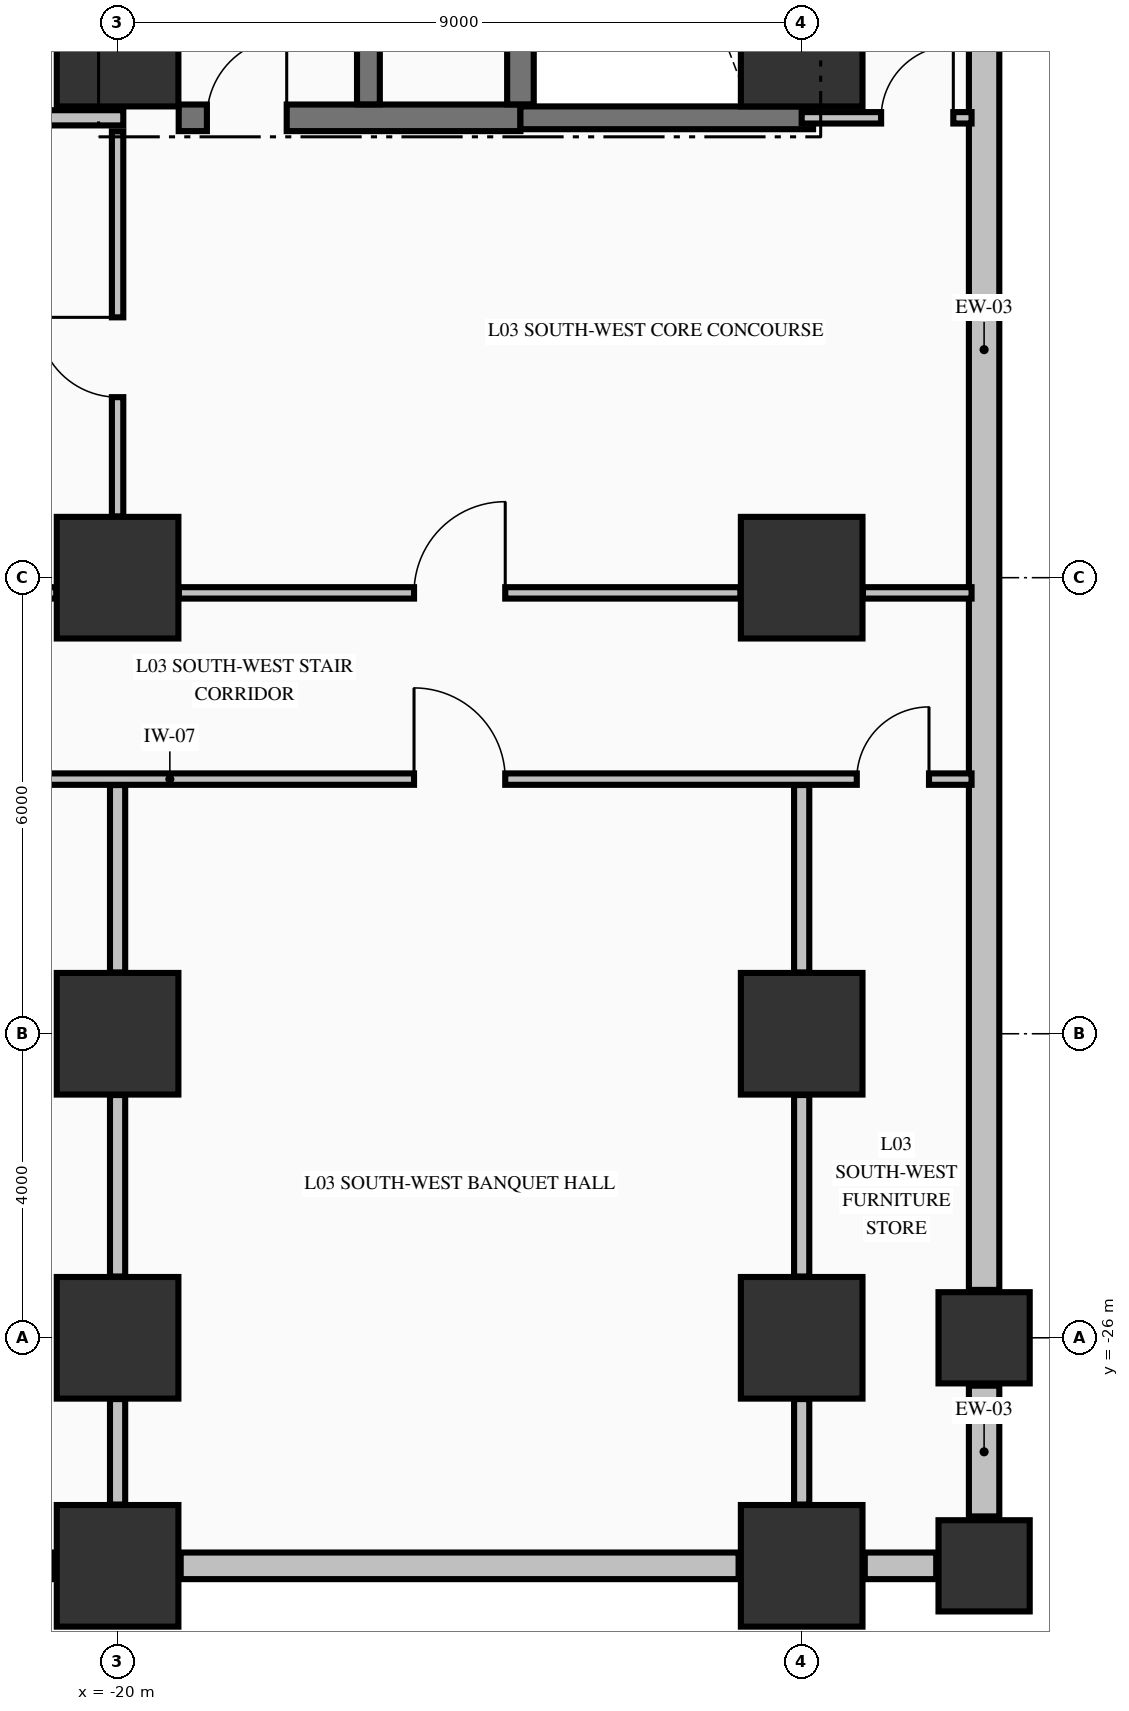
"""IFC4 building model, lengths in metres.
Left out: names, types, materials, properties, quantities, classifications, styles, units other than length and angle.
Written with IfcOpenShell. Run it as: python <this file> out.ifc"""

import sys

from ifc_helpers import new_model, si_unit, direction, frame, frame_2d, origin, origin_2d, place, context, subcontext, project, spatial, rectangle, extrude, element, fill, save


model = new_model("IFC4")
c1 = context("Model", 3, precision=1e-05, world=origin(), true_north=direction((0.0, 1.0)))
c2 = subcontext(c1, "Body", "Model", "MODEL_VIEW")
j1 = project(units=[si_unit("LENGTHUNIT", "METRE"), si_unit("PLANEANGLEUNIT", "RADIAN")], contexts=[c1])
p1 = place(None, origin())
s1 = spatial("IfcSite", under=j1, at=p1, CompositionType="ELEMENT")
p2 = place(p1, origin())
s2 = spatial("IfcBuilding", under=s1, at=p2, CompositionType="ELEMENT")
p3 = place(p2, frame((0.0, 0.0, 16.32)))
s3 = spatial("IfcBuildingStorey", under=s2, at=p3, CompositionType="ELEMENT", Elevation=16.32)
for number, where, z_axis, x_axis in (
    (1, (-20.0, -29.0, 0.0), (0.0, 0.0, 1.0), (1.0, 0.0, 0.0)),
    (2, (-20.0, -26.0, 0.0), (0.0, 0.0, 1.0), (1.0, 0.0, 0.0)),
    (3, (-20.0, -22.0, 0.0), (0.0, 0.0, 1.0), (1.0, 0.0, 0.0)),
    (4, (-20.0, -16.0, 0.0), (0.0, 0.0, 1.0), (1.0, 0.0, 0.0)),
    (5, (-20.0, -9.0, 0.0), (0.0, 0.0, 1.0), (1.0, 0.0, 0.0)),
    (6, (-11.0, -29.0, 0.0), (0.0, 0.0, 1.0), (1.0, 0.0, 0.0)),
    (7, (-11.0, -26.0, 0.0), (0.0, 0.0, 1.0), (1.0, 0.0, 0.0)),
    (8, (-11.0, -22.0, 0.0), (0.0, 0.0, 1.0), (1.0, 0.0, 0.0)),
    (9, (-11.0, -16.0, 0.0), (0.0, 0.0, 1.0), (1.0, 0.0, 0.0)),
    (10, (-11.0, -9.0, 0.0), (0.0, 0.0, 1.0), (1.0, 0.0, 0.0)),
):
    element("IfcColumn", number, at=place(p3, frame(where, z_axis=z_axis, x_axis=x_axis)), inside=s3, PredefinedType="COLUMN", context=c2, shape_type="SweptSolid", body=[
        extrude(rectangle(XDim=1.6, YDim=1.6, at=origin_2d()), origin(), (0.0, 0.0, 1.0), 4.99),
    ])
for number, where, z_axis, x_axis in (
    (11, (-8.6, -29.0, 0.0), (0.0, 0.0, 1.0), (1.0, 0.0, 0.0)),
    (12, (-8.6, -26.0, 0.0), (0.0, 0.0, 1.0), (1.0, 0.0, 0.0)),
):
    element("IfcColumn", number, at=place(p3, frame(where, z_axis=z_axis, x_axis=x_axis)), inside=s3, PredefinedType="COLUMN", context=c2, shape_type="SweptSolid", body=[
        extrude(rectangle(XDim=1.2, YDim=1.2, at=origin_2d()), origin(), (0.0, 0.0, 1.0), 4.99),
    ])
p4 = place(p3, frame((-22.545, -29.0, 0.0), z_axis=(0.0, 0.0, 1.0), x_axis=(1.0, 0.0, 0.0)))
e13 = element("IfcWall", 13, at=p4, inside=s3, PredefinedType="STANDARD", context=c2, shape_type="SweptSolid", body=[
    extrude(rectangle(XDim=1.715, YDim=0.35, at=frame_2d((0.857, 0.0))), origin(), (0.0, 0.0, 1.0), 3.332),
])
p5 = place(p3, frame((-19.17, -29.0, 0.0), z_axis=(0.0, 0.0, 1.0), x_axis=(1.0, 0.0, 0.0)))
e14 = element("IfcWall", 14, at=p5, inside=s3, PredefinedType="STANDARD", context=c2, shape_type="SweptSolid", body=[
    extrude(rectangle(XDim=7.34, YDim=0.35, at=frame_2d((3.67, 0.0))), origin(), (0.0, 0.0, 1.0), 3.332),
])
p6 = place(p3, frame((-10.17, -29.0, 0.0), z_axis=(0.0, 0.0, 1.0), x_axis=(1.0, 0.0, 0.0)))
e15 = element("IfcWall", 15, at=p6, inside=s3, PredefinedType="STANDARD", context=c2, shape_type="SweptSolid", body=[
    extrude(rectangle(XDim=0.94, YDim=0.35, at=frame_2d((0.47, 0.0))), origin(), (0.0, 0.0, 1.0), 3.332),
])
p7 = place(p3, frame((-8.6, -28.35, 0.0), z_axis=(0.0, 0.0, 1.0), x_axis=(0.0, 1.0, 0.0)))
e16 = element("IfcWall", 16, at=p7, inside=s3, PredefinedType="STANDARD", context=c2, shape_type="SweptSolid", body=[
    extrude(rectangle(XDim=1.72, YDim=0.4, at=frame_2d((0.86, 0.0))), origin(), (0.0, 0.0, 1.0), 3.332),
])
p8 = place(p3, frame((-8.6, -25.37, 0.0), z_axis=(0.0, 0.0, 1.0), x_axis=(0.0, 1.0, 0.0)))
e17 = element("IfcWall", 17, at=p8, inside=s3, PredefinedType="STANDARD", context=c2, shape_type="SweptSolid", body=[
    extrude(rectangle(XDim=24.72, YDim=0.4, at=frame_2d((12.36, 0.0))), origin(), (0.0, 0.0, 1.0), 2.582),
])
p9 = place(p3, frame((-19.196, -9.95, 0.0), z_axis=(0.0, 0.0, 1.0), x_axis=(1.0, 0.0, 0.0)))
e18 = element("IfcWall", 18, at=p9, inside=s3, PredefinedType="SHEAR", context=c2, shape_type="SweptSolid", body=[
    extrude(rectangle(XDim=4.496, YDim=0.35, at=frame_2d((2.248, 0.0))), origin(), (0.0, 0.0, 1.0), 4.99),
])
p10 = place(p9, frame((0.371, 0.0, 0.0)))
e19 = element("IfcOpeningElement", 19, at=p10, cuts=e18, PredefinedType="OPENING", context=c2, shape_type="SweptSolid", body=[
    extrude(rectangle(XDim=1.05, YDim=2.15, at=frame_2d((0.525, 1.075))), frame((0.0, 0.185, 0.0), z_axis=(0.0, -1.0, 0.0), x_axis=(1.0, 0.0, 0.0)), (0.0, 0.0, 1.0), 0.37),
])
p11 = place(p3, frame((-14.7, -9.95, 0.0), z_axis=(0.0, 0.0, 1.0), x_axis=(1.0, 0.0, 0.0)))
e20 = element("IfcWall", 20, at=p11, inside=s3, PredefinedType="SHEAR", context=c2, shape_type="SweptSolid", body=[
    extrude(rectangle(XDim=3.85, YDim=0.3, at=frame_2d((1.925, 0.0))), origin(), (0.0, 0.0, 1.0), 4.99),
])
p12 = place(p3, frame((-29.85, -18.65, 0.0), z_axis=(0.0, 0.0, 1.0), x_axis=(1.0, 0.0, 0.0)))
e21 = element("IfcWall", 21, at=p12, inside=s3, PredefinedType="PARTITIONING", context=c2, shape_type="SweptSolid", body=[
    extrude(rectangle(XDim=21.085, YDim=0.15, at=frame_2d((10.542, 0.0))), origin(), (0.0, 0.0, 1.0), 4.99),
])
p13 = place(p12, frame((1.425, 0.0, 0.0)))
e22 = element("IfcOpeningElement", 22, at=p13, cuts=e21, PredefinedType="OPENING", context=c2, shape_type="SweptSolid", body=[
    extrude(rectangle(XDim=0.95, YDim=2.15, at=frame_2d((0.475, 1.075))), frame((0.0, 0.085, 0.0), z_axis=(0.0, -1.0, 0.0), x_axis=(1.0, 0.0, 0.0)), (0.0, 0.0, 1.0), 0.17),
])
p14 = place(p12, frame((6.375, 0.0, 0.0)))
e23 = element("IfcOpeningElement", 23, at=p14, cuts=e21, PredefinedType="OPENING", context=c2, shape_type="SweptSolid", body=[
    extrude(rectangle(XDim=0.95, YDim=2.15, at=frame_2d((0.475, 1.075))), frame((0.0, 0.085, 0.0), z_axis=(0.0, -1.0, 0.0), x_axis=(1.0, 0.0, 0.0)), (0.0, 0.0, 1.0), 0.17),
])
p15 = place(p12, frame((13.75, 0.0, 0.0)))
e24 = element("IfcOpeningElement", 24, at=p15, cuts=e21, PredefinedType="OPENING", context=c2, shape_type="SweptSolid", body=[
    extrude(rectangle(XDim=1.2, YDim=2.15, at=frame_2d((0.6, 1.075))), frame((0.0, 0.085, 0.0), z_axis=(0.0, -1.0, 0.0), x_axis=(1.0, 0.0, 0.0)), (0.0, 0.0, 1.0), 0.17),
])
p16 = place(p12, frame((19.575, 0.0, 0.0)))
e25 = element("IfcOpeningElement", 25, at=p16, cuts=e21, PredefinedType="OPENING", context=c2, shape_type="SweptSolid", body=[
    extrude(rectangle(XDim=0.95, YDim=2.15, at=frame_2d((0.475, 1.075))), frame((0.0, 0.085, 0.0), z_axis=(0.0, -1.0, 0.0), x_axis=(1.0, 0.0, 0.0)), (0.0, 0.0, 1.0), 0.17),
])
p17 = place(p3, frame((-25.294, -16.2, 0.0), z_axis=(0.0, 0.0, 1.0), x_axis=(1.0, 0.0, 0.0)))
e26 = element("IfcWall", 26, at=p17, inside=s3, PredefinedType="PARTITIONING", context=c2, shape_type="SweptSolid", body=[
    extrude(rectangle(XDim=4.488, YDim=0.15, at=frame_2d((2.244, 0.0))), origin(), (0.0, 0.0, 1.0), 3.332),
])
p18 = place(p17, frame((0.619, 0.0, 0.0)))
e27 = element("IfcOpeningElement", 27, at=p18, cuts=e26, PredefinedType="OPENING", context=c2, shape_type="SweptSolid", body=[
    extrude(rectangle(XDim=0.95, YDim=2.15, at=frame_2d((0.475, 1.075))), frame((0.0, 0.085, 0.0), z_axis=(0.0, -1.0, 0.0), x_axis=(1.0, 0.0, 0.0)), (0.0, 0.0, 1.0), 0.17),
])
p19 = place(p3, frame((-19.194, -16.2, 0.0), z_axis=(0.0, 0.0, 1.0), x_axis=(1.0, 0.0, 0.0)))
e28 = element("IfcWall", 28, at=p19, inside=s3, PredefinedType="PARTITIONING", context=c2, shape_type="SweptSolid", body=[
    extrude(rectangle(XDim=7.388, YDim=0.15, at=frame_2d((3.694, 0.0))), origin(), (0.0, 0.0, 1.0), 3.332),
])
p20 = place(p19, frame((3.094, 0.0, 0.0)))
e29 = element("IfcOpeningElement", 29, at=p20, cuts=e28, PredefinedType="OPENING", context=c2, shape_type="SweptSolid", body=[
    extrude(rectangle(XDim=1.2, YDim=2.15, at=frame_2d((0.6, 1.075))), frame((0.0, 0.085, 0.0), z_axis=(0.0, -1.0, 0.0), x_axis=(1.0, 0.0, 0.0)), (0.0, 0.0, 1.0), 0.17),
])
p21 = place(p3, frame((-10.194, -16.2, 0.0), z_axis=(0.0, 0.0, 1.0), x_axis=(1.0, 0.0, 0.0)))
e30 = element("IfcWall", 30, at=p21, inside=s3, PredefinedType="PARTITIONING", context=c2, shape_type="SweptSolid", body=[
    extrude(rectangle(XDim=1.429, YDim=0.15, at=frame_2d((0.715, 0.0))), origin(), (0.0, 0.0, 1.0), 4.99),
])
p22 = place(p3, frame((-22.475, -9.95, 0.0), z_axis=(0.0, 0.0, 1.0), x_axis=(1.0, 0.0, 0.0)))
e31 = element("IfcWall", 31, at=p22, inside=s3, PredefinedType="PARTITIONING", context=c2, shape_type="SweptSolid", body=[
    extrude(rectangle(XDim=2.55, YDim=0.2, at=frame_2d((1.275, 0.0))), origin(), (0.0, 0.0, 1.0), 4.99),
])
p23 = place(p22, frame((0.455, 0.0, 0.0)))
e32 = element("IfcOpeningElement", 32, at=p23, cuts=e31, PredefinedType="OPENING", context=c2, shape_type="SweptSolid", body=[
    extrude(rectangle(XDim=1.0, YDim=2.15, at=frame_2d((0.5, 1.075))), frame((0.0, 0.11, 0.0), z_axis=(0.0, -1.0, 0.0), x_axis=(1.0, 0.0, 0.0)), (0.0, 0.0, 1.0), 0.22),
])
p24 = place(p3, frame((-11.0, -9.95, 0.0), z_axis=(0.0, 0.0, 1.0), x_axis=(1.0, 0.0, 0.0)))
e33 = element("IfcWall", 33, at=p24, inside=s3, PredefinedType="PARTITIONING", context=c2, shape_type="SweptSolid", body=[
    extrude(rectangle(XDim=2.235, YDim=0.15, at=frame_2d((1.118, 0.0))), origin(), (0.0, 0.0, 1.0), 4.99),
])
p25 = place(p24, frame((1.045, 0.0, 0.0)))
e34 = element("IfcOpeningElement", 34, at=p25, cuts=e33, PredefinedType="OPENING", context=c2, shape_type="SweptSolid", body=[
    extrude(rectangle(XDim=0.95, YDim=2.15, at=frame_2d((0.475, 1.075))), frame((0.0, 0.085, 0.0), z_axis=(0.0, -1.0, 0.0), x_axis=(1.0, 0.0, 0.0)), (0.0, 0.0, 1.0), 0.17),
])
p26 = place(p3, frame((-16.7, -9.773, 0.0), z_axis=(0.0, 0.0, 1.0), x_axis=(0.0, 1.0, 0.0)))
e35 = element("IfcWall", 35, at=p26, inside=s3, PredefinedType="SHEAR", context=c2, shape_type="SweptSolid", body=[
    extrude(rectangle(XDim=9.371, YDim=0.3, at=frame_2d((4.686, 0.0))), origin(), (0.0, 0.0, 1.0), 4.99),
])
p27 = place(p3, frame((-14.7, -9.773, 0.0), z_axis=(0.0, 0.0, 1.0), x_axis=(0.0, 1.0, 0.0)))
e36 = element("IfcWall", 36, at=p27, inside=s3, PredefinedType="SHEAR", context=c2, shape_type="SweptSolid", body=[
    extrude(rectangle(XDim=9.371, YDim=0.35, at=frame_2d((4.686, 0.0))), origin(), (0.0, 0.0, 1.0), 4.99),
])
p28 = place(p3, frame((-20.0, -28.194, 0.0), z_axis=(0.0, 0.0, 1.0), x_axis=(0.0, 1.0, 0.0)))
e37 = element("IfcWall", 37, at=p28, inside=s3, PredefinedType="PARTITIONING", context=c2, shape_type="SweptSolid", body=[
    extrude(rectangle(XDim=1.388, YDim=0.2, at=frame_2d((0.694, 0.0))), origin(), (0.0, 0.0, 1.0), 3.332),
])
p29 = place(p3, frame((-20.0, -25.194, 0.0), z_axis=(0.0, 0.0, 1.0), x_axis=(0.0, 1.0, 0.0)))
e38 = element("IfcWall", 38, at=p29, inside=s3, PredefinedType="PARTITIONING", context=c2, shape_type="SweptSolid", body=[
    extrude(rectangle(XDim=2.388, YDim=0.2, at=frame_2d((1.194, 0.0))), origin(), (0.0, 0.0, 1.0), 3.332),
])
p30 = place(p3, frame((-20.0, -21.194, 0.0), z_axis=(0.0, 0.0, 1.0), x_axis=(0.0, 1.0, 0.0)))
e39 = element("IfcWall", 39, at=p30, inside=s3, PredefinedType="PARTITIONING", context=c2, shape_type="SweptSolid", body=[
    extrude(rectangle(XDim=2.466, YDim=0.2, at=frame_2d((1.233, 0.0))), origin(), (0.0, 0.0, 1.0), 3.332),
])
p31 = place(p3, frame((-20.0, -15.194, 0.0), z_axis=(0.0, 0.0, 1.0), x_axis=(0.0, 1.0, 0.0)))
e40 = element("IfcWall", 40, at=p31, inside=s3, PredefinedType="PARTITIONING", context=c2, shape_type="SweptSolid", body=[
    extrude(rectangle(XDim=5.066, YDim=0.15, at=frame_2d((2.533, 0.0))), origin(), (0.0, 0.0, 1.0), 4.99),
])
p32 = place(p31, frame((1.569, 0.0, 0.0)))
e41 = element("IfcOpeningElement", 41, at=p32, cuts=e40, PredefinedType="OPENING", context=c2, shape_type="SweptSolid", body=[
    extrude(rectangle(XDim=1.05, YDim=2.15, at=frame_2d((0.525, 1.075))), frame((0.0, 0.085, 0.0), z_axis=(0.0, -1.0, 0.0), x_axis=(1.0, 0.0, 0.0)), (0.0, 0.0, 1.0), 0.17),
])
p33 = place(p3, frame((-11.0, -28.194, 0.0), z_axis=(0.0, 0.0, 1.0), x_axis=(0.0, 1.0, 0.0)))
e42 = element("IfcWall", 42, at=p33, inside=s3, PredefinedType="PARTITIONING", context=c2, shape_type="SweptSolid", body=[
    extrude(rectangle(XDim=1.388, YDim=0.2, at=frame_2d((0.694, 0.0))), origin(), (0.0, 0.0, 1.0), 3.332),
])
p34 = place(p3, frame((-11.0, -25.194, 0.0), z_axis=(0.0, 0.0, 1.0), x_axis=(0.0, 1.0, 0.0)))
e43 = element("IfcWall", 43, at=p34, inside=s3, PredefinedType="PARTITIONING", context=c2, shape_type="SweptSolid", body=[
    extrude(rectangle(XDim=2.388, YDim=0.2, at=frame_2d((1.194, 0.0))), origin(), (0.0, 0.0, 1.0), 3.332),
])
p35 = place(p3, frame((-11.0, -21.194, 0.0), z_axis=(0.0, 0.0, 1.0), x_axis=(0.0, 1.0, 0.0)))
e44 = element("IfcWall", 44, at=p35, inside=s3, PredefinedType="PARTITIONING", context=c2, shape_type="SweptSolid", body=[
    extrude(rectangle(XDim=2.466, YDim=0.2, at=frame_2d((1.233, 0.0))), origin(), (0.0, 0.0, 1.0), 3.332),
])
p36 = place(p10, origin())
e45 = element("IfcDoor", 45, at=p36, inside=s3, OperationType="SINGLE_SWING_RIGHT", PredefinedType="DOOR", context=c2, shape_type="SweptSolid", body=[
    extrude(rectangle(XDim=1.05, YDim=2.15, at=frame_2d((0.525, 1.075))), frame((0.0, 0.025, 0.0), z_axis=(0.0, -1.0, 0.0), x_axis=(1.0, 0.0, 0.0)), (0.0, 0.0, 1.0), 0.05),
])
fill(e19, e45)
p37 = place(p25, origin())
e46 = element("IfcDoor", 46, at=p37, inside=s3, OperationType="SINGLE_SWING_RIGHT", PredefinedType="DOOR", context=c2, shape_type="SweptSolid", body=[
    extrude(rectangle(XDim=0.95, YDim=2.15, at=frame_2d((0.475, 1.075))), frame((0.0, 0.025, 0.0), z_axis=(0.0, -1.0, 0.0), x_axis=(1.0, 0.0, 0.0)), (0.0, 0.0, 1.0), 0.05),
])
fill(e34, e46)
p38 = place(p32, origin())
e47 = element("IfcDoor", 47, at=p38, inside=s3, OperationType="SINGLE_SWING_RIGHT", PredefinedType="DOOR", context=c2, shape_type="SweptSolid", body=[
    extrude(rectangle(XDim=1.05, YDim=2.15, at=frame_2d((0.525, 1.075))), frame((0.0, 0.025, 0.0), z_axis=(0.0, -1.0, 0.0), x_axis=(1.0, 0.0, 0.0)), (0.0, 0.0, 1.0), 0.05),
])
fill(e41, e47)
p39 = place(p20, origin())
e48 = element("IfcDoor", 48, at=p39, inside=s3, OperationType="SINGLE_SWING_RIGHT", PredefinedType="DOOR", context=c2, shape_type="SweptSolid", body=[
    extrude(rectangle(XDim=1.2, YDim=2.15, at=frame_2d((0.6, 1.075))), frame((0.0, 0.025, 0.0), z_axis=(0.0, -1.0, 0.0), x_axis=(1.0, 0.0, 0.0)), (0.0, 0.0, 1.0), 0.05),
])
fill(e29, e48)
p40 = place(p15, origin())
e49 = element("IfcDoor", 49, at=p40, inside=s3, OperationType="SINGLE_SWING_LEFT", PredefinedType="DOOR", context=c2, shape_type="SweptSolid", body=[
    extrude(rectangle(XDim=1.2, YDim=2.15, at=frame_2d((0.6, 1.075))), frame((0.0, 0.025, 0.0), z_axis=(0.0, -1.0, 0.0), x_axis=(1.0, 0.0, 0.0)), (0.0, 0.0, 1.0), 0.05),
])
fill(e24, e49)
p41 = place(p16, origin())
e50 = element("IfcDoor", 50, at=p41, inside=s3, OperationType="SINGLE_SWING_RIGHT", PredefinedType="DOOR", context=c2, shape_type="SweptSolid", body=[
    extrude(rectangle(XDim=0.95, YDim=2.15, at=frame_2d((0.475, 1.075))), frame((0.0, 0.025, 0.0), z_axis=(0.0, -1.0, 0.0), x_axis=(1.0, 0.0, 0.0)), (0.0, 0.0, 1.0), 0.05),
])
fill(e25, e50)
save(model, sys.argv[1])
